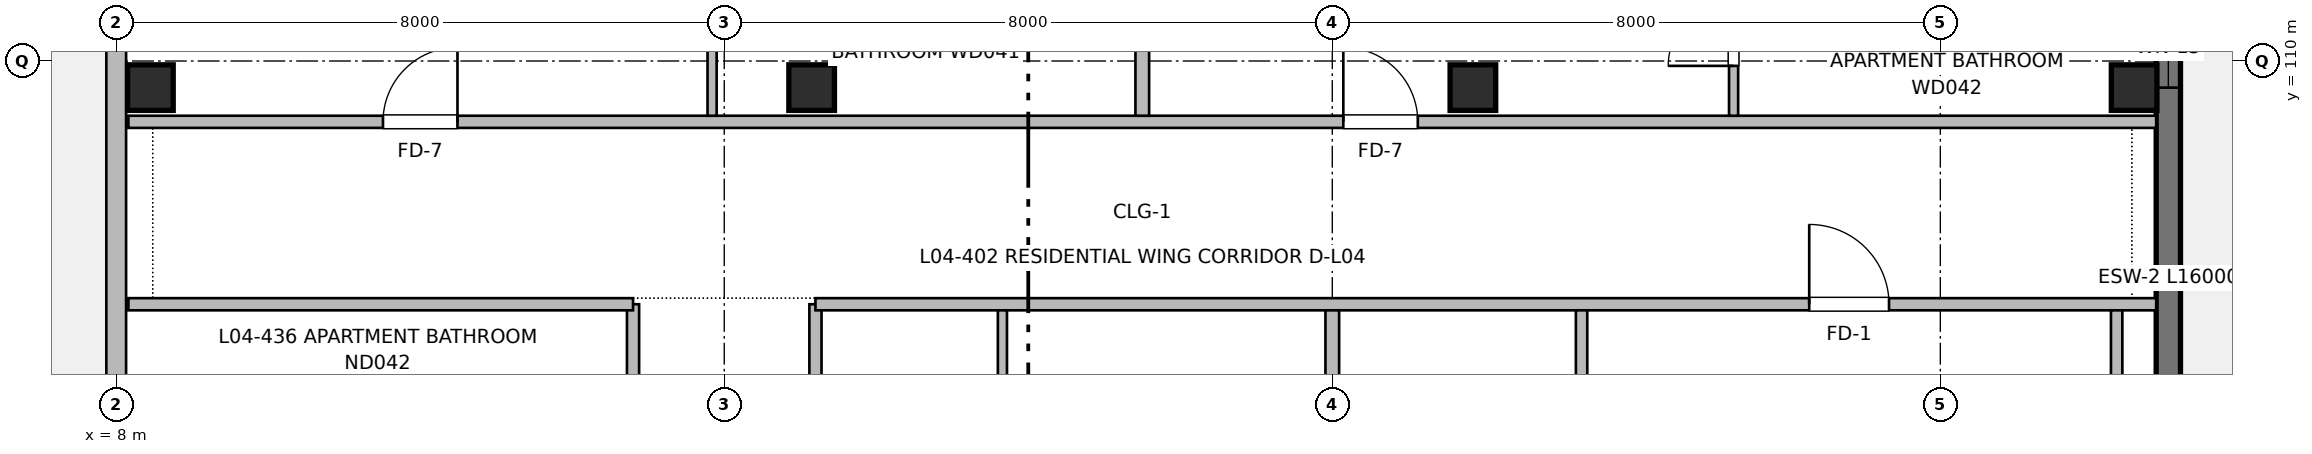
"""IFC4 building model, lengths in metres.
Left out: names, types, materials, properties, quantities, classifications, styles, units other than length and angle.
Written with IfcOpenShell. Run it as: python <this file> out.ifc"""

import sys

from ifc_helpers import new_model, si_unit, direction, frame, frame_2d, origin, origin_2d, place, context, subcontext, project, spatial, rectangle, extrude, element, fill, save


model = new_model("IFC4")
c1 = context("Model", 3, precision=1e-05, world=origin(), true_north=direction((0.0, 1.0)))
c2 = subcontext(c1, "Body", "Model", "MODEL_VIEW")
j1 = project(units=[si_unit("LENGTHUNIT", "METRE"), si_unit("PLANEANGLEUNIT", "RADIAN")], contexts=[c1])
p1 = place(None, origin())
s1 = spatial("IfcSite", under=j1, at=p1, CompositionType="ELEMENT")
p2 = place(p1, origin())
s2 = spatial("IfcBuilding", under=s1, at=p2, CompositionType="ELEMENT")
p3 = place(p2, frame((0.0, 0.0, 13.76)))
s3 = spatial("IfcBuildingStorey", under=s2, at=p3, CompositionType="ELEMENT", Elevation=13.76)
for number, where, z_axis, x_axis in (
    (1, (8.45, 109.65, 0.0), (0.0, 0.0, 1.0), (1.0, 0.0, 0.0)),
    (2, (17.15, 109.65, 0.0), (0.0, 0.0, 1.0), (1.0, 0.0, 0.0)),
    (3, (25.85, 109.65, 0.0), (0.0, 0.0, 1.0), (1.0, 0.0, 0.0)),
    (4, (34.55, 109.65, 0.0), (0.0, 0.0, 1.0), (1.0, 0.0, 0.0)),
):
    element("IfcColumn", number, at=place(p3, frame(where, z_axis=z_axis, x_axis=x_axis)), inside=s3, PredefinedType="COLUMN", context=c2, shape_type="SweptSolid", body=[
        extrude(rectangle(XDim=0.6, YDim=0.6, at=origin_2d()), origin(), (0.0, 0.0, 1.0), 3.2),
    ])
p4 = place(p3, frame((35.0, 116.0, 0.0), z_axis=(0.0, 0.0, 1.0), x_axis=(0.0, -1.0, 0.0)))
e5 = element("IfcWall", 5, at=p4, inside=s3, PredefinedType="SHEAR", context=c2, shape_type="SweptSolid", body=[
    extrude(rectangle(XDim=16.0, YDim=0.32, at=frame_2d((8.0, 0.0))), origin(), (0.0, 0.0, 1.0), 2.98),
])
p5 = place(p4, frame((2.95, 0.0, 0.0)))
e6 = element("IfcOpeningElement", 6, at=p5, cuts=e5, PredefinedType="OPENING", context=c2, shape_type="SweptSolid", body=[
    extrude(rectangle(XDim=1.2, YDim=2.2, at=frame_2d((0.6, 1.1))), frame((0.0, 0.17, 0.0), z_axis=(0.0, -1.0, 0.0), x_axis=(1.0, 0.0, 0.0)), (0.0, 0.0, 1.0), 0.34),
])
p6 = place(p4, frame((5.3, 0.0, 0.9)))
e7 = element("IfcOpeningElement", 7, at=p6, cuts=e5, PredefinedType="OPENING", context=c2, shape_type="SweptSolid", body=[
    extrude(rectangle(XDim=1.05, YDim=1.15, at=frame_2d((0.525, 0.575))), frame((0.0, 0.17, 0.0), z_axis=(0.0, -1.0, 0.0), x_axis=(1.0, 0.0, 0.0)), (0.0, 0.0, 1.0), 0.34),
])
p7 = place(p4, frame((11.35, 0.0, 0.82)))
e8 = element("IfcOpeningElement", 8, at=p7, cuts=e5, PredefinedType="OPENING", context=c2, shape_type="SweptSolid", body=[
    extrude(rectangle(XDim=1.3, YDim=1.4, at=frame_2d((0.65, 0.7))), frame((0.0, 0.17, 0.0), z_axis=(0.0, -1.0, 0.0), x_axis=(1.0, 0.0, 0.0)), (0.0, 0.0, 1.0), 0.34),
])
p8 = place(p3, frame((8.0, 56.0, 0.0), z_axis=(0.0, 0.0, 1.0), x_axis=(0.0, 1.0, 0.0)))
e9 = element("IfcWall", 9, at=p8, inside=s3, PredefinedType="SOLIDWALL", context=c2, shape_type="SweptSolid", body=[
    extrude(rectangle(XDim=60.0, YDim=0.26, at=frame_2d((30.0, 0.0))), origin(), (0.0, 0.0, 1.0), 2.98),
])
p9 = place(p8, frame((3.686, 0.0, 0.0)))
e10 = element("IfcOpeningElement", 10, at=p9, cuts=e9, PredefinedType="OPENING", context=c2, shape_type="SweptSolid", body=[
    extrude(rectangle(XDim=1.2, YDim=2.2, at=frame_2d((0.6, 1.1))), frame((0.0, 0.14, 0.0), z_axis=(0.0, -1.0, 0.0), x_axis=(1.0, 0.0, 0.0)), (0.0, 0.0, 1.0), 0.28),
])
p10 = place(p8, frame((5.586, 0.0, 0.9)))
e11 = element("IfcOpeningElement", 11, at=p10, cuts=e9, PredefinedType="OPENING", context=c2, shape_type="SweptSolid", body=[
    extrude(rectangle(XDim=1.05, YDim=1.15, at=frame_2d((0.525, 0.575))), frame((0.0, 0.14, 0.0), z_axis=(0.0, -1.0, 0.0), x_axis=(1.0, 0.0, 0.0)), (0.0, 0.0, 1.0), 0.28),
])
p11 = place(p8, frame((12.207, 0.0, 0.82)))
e12 = element("IfcOpeningElement", 12, at=p11, cuts=e9, PredefinedType="OPENING", context=c2, shape_type="SweptSolid", body=[
    extrude(rectangle(XDim=1.3, YDim=1.4, at=frame_2d((0.65, 0.7))), frame((0.0, 0.14, 0.0), z_axis=(0.0, -1.0, 0.0), x_axis=(1.0, 0.0, 0.0)), (0.0, 0.0, 1.0), 0.28),
])
p12 = place(p8, frame((19.079, 0.0, 0.67)))
e13 = element("IfcOpeningElement", 13, at=p12, cuts=e9, PredefinedType="OPENING", context=c2, shape_type="SweptSolid", body=[
    extrude(rectangle(XDim=2.1, YDim=1.55, at=frame_2d((1.05, 0.775))), frame((0.0, 0.14, 0.0), z_axis=(0.0, -1.0, 0.0), x_axis=(1.0, 0.0, 0.0)), (0.0, 0.0, 1.0), 0.28),
])
p13 = place(p8, frame((29.325, 0.0, 0.72)))
e14 = element("IfcOpeningElement", 14, at=p13, cuts=e9, PredefinedType="OPENING", context=c2, shape_type="SweptSolid", body=[
    extrude(rectangle(XDim=2.25, YDim=1.5, at=frame_2d((1.125, 0.75))), frame((0.0, 0.14, 0.0), z_axis=(0.0, -1.0, 0.0), x_axis=(1.0, 0.0, 0.0)), (0.0, 0.0, 1.0), 0.28),
])
p14 = place(p8, frame((38.046, 0.0, 0.9)))
e15 = element("IfcOpeningElement", 15, at=p14, cuts=e9, PredefinedType="OPENING", context=c2, shape_type="SweptSolid", body=[
    extrude(rectangle(XDim=1.05, YDim=1.15, at=frame_2d((0.525, 0.575))), frame((0.0, 0.14, 0.0), z_axis=(0.0, -1.0, 0.0), x_axis=(1.0, 0.0, 0.0)), (0.0, 0.0, 1.0), 0.28),
])
p15 = place(p8, frame((46.543, 0.0, 0.9)))
e16 = element("IfcOpeningElement", 16, at=p15, cuts=e9, PredefinedType="OPENING", context=c2, shape_type="SweptSolid", body=[
    extrude(rectangle(XDim=1.2, YDim=1.05, at=frame_2d((0.6, 0.525))), frame((0.0, 0.14, 0.0), z_axis=(0.0, -1.0, 0.0), x_axis=(1.0, 0.0, 0.0)), (0.0, 0.0, 1.0), 0.28),
])
p16 = place(p8, frame((55.839, 0.0, 0.9)))
e17 = element("IfcOpeningElement", 17, at=p16, cuts=e9, PredefinedType="OPENING", context=c2, shape_type="SweptSolid", body=[
    extrude(rectangle(XDim=0.65, YDim=0.95, at=frame_2d((0.325, 0.475))), frame((0.0, 0.14, 0.0), z_axis=(0.0, -1.0, 0.0), x_axis=(1.0, 0.0, 0.0)), (0.0, 0.0, 1.0), 0.28),
])
p17 = place(p3, frame((14.8, 56.16, 0.0), z_axis=(0.0, 0.0, 1.0), x_axis=(0.0, 1.0, 0.0)))
e18 = element("IfcWall", 18, at=p17, inside=s3, PredefinedType="PARTITIONING", context=c2, shape_type="SweptSolid", body=[
    extrude(rectangle(XDim=50.64, YDim=0.16, at=frame_2d((25.32, 0.0))), origin(), (0.0, 0.0, 1.0), 2.935),
])
p18 = place(p17, frame((12.84, 0.0, 0.0)))
e19 = element("IfcOpeningElement", 19, at=p18, cuts=e18, PredefinedType="OPENING", context=c2, shape_type="SweptSolid", body=[
    extrude(rectangle(XDim=1.1, YDim=2.15, at=frame_2d((0.55, 1.075))), frame((0.0, 0.09, 0.0), z_axis=(0.0, -1.0, 0.0), x_axis=(1.0, 0.0, 0.0)), (0.0, 0.0, 1.0), 0.18),
])
p19 = place(p17, frame((19.24, 0.0, 0.0)))
e20 = element("IfcOpeningElement", 20, at=p19, cuts=e18, PredefinedType="OPENING", context=c2, shape_type="SweptSolid", body=[
    extrude(rectangle(XDim=1.6, YDim=2.15, at=frame_2d((0.8, 1.075))), frame((0.0, 0.09, 0.0), z_axis=(0.0, -1.0, 0.0), x_axis=(1.0, 0.0, 0.0)), (0.0, 0.0, 1.0), 0.18),
])
p20 = place(p17, frame((1.8, 0.0, 0.0)))
e21 = element("IfcOpeningElement", 21, at=p20, cuts=e18, PredefinedType="OPENING", context=c2, shape_type="SweptSolid", body=[
    extrude(rectangle(XDim=0.96, YDim=2.15, at=frame_2d((0.48, 1.075))), frame((0.0, 0.09, 0.0), z_axis=(0.0, -1.0, 0.0), x_axis=(1.0, 0.0, 0.0)), (0.0, 0.0, 1.0), 0.18),
])
p21 = place(p17, frame((32.745, 0.0, 0.0)))
e22 = element("IfcOpeningElement", 22, at=p21, cuts=e18, PredefinedType="OPENING", context=c2, shape_type="SweptSolid", body=[
    extrude(rectangle(XDim=0.98, YDim=2.15, at=frame_2d((0.49, 1.075))), frame((0.0, 0.09, 0.0), z_axis=(0.0, -1.0, 0.0), x_axis=(1.0, 0.0, 0.0)), (0.0, 0.0, 1.0), 0.18),
])
p22 = place(p17, frame((40.955, 0.0, 0.0)))
e23 = element("IfcOpeningElement", 23, at=p22, cuts=e18, PredefinedType="OPENING", context=c2, shape_type="SweptSolid", body=[
    extrude(rectangle(XDim=0.98, YDim=2.15, at=frame_2d((0.49, 1.075))), frame((0.0, 0.09, 0.0), z_axis=(0.0, -1.0, 0.0), x_axis=(1.0, 0.0, 0.0)), (0.0, 0.0, 1.0), 0.18),
])
p23 = place(p3, frame((17.2, 56.16, 0.0), z_axis=(0.0, 0.0, 1.0), x_axis=(0.0, 1.0, 0.0)))
e24 = element("IfcWall", 24, at=p23, inside=s3, PredefinedType="PARTITIONING", context=c2, shape_type="SweptSolid", body=[
    extrude(rectangle(XDim=50.64, YDim=0.16, at=frame_2d((25.32, 0.0))), origin(), (0.0, 0.0, 1.0), 2.935),
])
p24 = place(p23, frame((6.99, 0.0, 0.0)))
e25 = element("IfcOpeningElement", 25, at=p24, cuts=e24, PredefinedType="OPENING", context=c2, shape_type="SweptSolid", body=[
    extrude(rectangle(XDim=0.98, YDim=2.15, at=frame_2d((0.49, 1.075))), frame((0.0, 0.09, 0.0), z_axis=(0.0, -1.0, 0.0), x_axis=(1.0, 0.0, 0.0)), (0.0, 0.0, 1.0), 0.18),
])
p25 = place(p23, frame((20.92, 0.0, 0.0)))
e26 = element("IfcOpeningElement", 26, at=p25, cuts=e24, PredefinedType="OPENING", context=c2, shape_type="SweptSolid", body=[
    extrude(rectangle(XDim=0.98, YDim=2.15, at=frame_2d((0.49, 1.075))), frame((0.0, 0.09, 0.0), z_axis=(0.0, -1.0, 0.0), x_axis=(1.0, 0.0, 0.0)), (0.0, 0.0, 1.0), 0.18),
])
p26 = place(p23, frame((33.68, 0.0, 0.0)))
e27 = element("IfcOpeningElement", 27, at=p26, cuts=e24, PredefinedType="OPENING", context=c2, shape_type="SweptSolid", body=[
    extrude(rectangle(XDim=0.98, YDim=2.15, at=frame_2d((0.49, 1.075))), frame((0.0, 0.09, 0.0), z_axis=(0.0, -1.0, 0.0), x_axis=(1.0, 0.0, 0.0)), (0.0, 0.0, 1.0), 0.18),
])
p27 = place(p23, frame((45.08, 0.0, 0.0)))
e28 = element("IfcOpeningElement", 28, at=p27, cuts=e24, PredefinedType="OPENING", context=c2, shape_type="SweptSolid", body=[
    extrude(rectangle(XDim=0.98, YDim=2.15, at=frame_2d((0.49, 1.075))), frame((0.0, 0.09, 0.0), z_axis=(0.0, -1.0, 0.0), x_axis=(1.0, 0.0, 0.0)), (0.0, 0.0, 1.0), 0.18),
])
p28 = place(p3, frame((8.16, 106.8, 0.0), z_axis=(0.0, 0.0, 1.0), x_axis=(1.0, 0.0, 0.0)))
e29 = element("IfcWall", 29, at=p28, inside=s3, PredefinedType="PARTITIONING", context=c2, shape_type="SweptSolid", body=[
    extrude(rectangle(XDim=6.64, YDim=0.16, at=frame_2d((3.32, 0.0))), origin(), (0.0, 0.0, 1.0), 2.935),
])
p29 = place(p3, frame((17.2, 106.8, 0.0), z_axis=(0.0, 0.0, 1.0), x_axis=(1.0, 0.0, 0.0)))
e30 = element("IfcWall", 30, at=p29, inside=s3, PredefinedType="PARTITIONING", context=c2, shape_type="SweptSolid", body=[
    extrude(rectangle(XDim=17.64, YDim=0.16, at=frame_2d((8.82, 0.0))), origin(), (0.0, 0.0, 1.0), 2.935),
])
p30 = place(p29, frame((13.075, 0.0, 0.0)))
e31 = element("IfcOpeningElement", 31, at=p30, cuts=e30, PredefinedType="OPENING", context=c2, shape_type="SweptSolid", body=[
    extrude(rectangle(XDim=1.05, YDim=2.15, at=frame_2d((0.525, 1.075))), frame((0.0, 0.09, 0.0), z_axis=(0.0, -1.0, 0.0), x_axis=(1.0, 0.0, 0.0)), (0.0, 0.0, 1.0), 0.18),
])
p31 = place(p3, frame((8.16, 109.2, 0.0), z_axis=(0.0, 0.0, 1.0), x_axis=(1.0, 0.0, 0.0)))
e32 = element("IfcWall", 32, at=p31, inside=s3, PredefinedType="PARTITIONING", context=c2, shape_type="SweptSolid", body=[
    extrude(rectangle(XDim=26.68, YDim=0.16, at=frame_2d((13.34, 0.0))), origin(), (0.0, 0.0, 1.0), 2.935),
])
p32 = place(p31, frame((3.35, 0.0, 0.0)))
e33 = element("IfcOpeningElement", 33, at=p32, cuts=e32, PredefinedType="OPENING", context=c2, shape_type="SweptSolid", body=[
    extrude(rectangle(XDim=0.98, YDim=2.15, at=frame_2d((0.49, 1.075))), frame((0.0, 0.09, 0.0), z_axis=(0.0, -1.0, 0.0), x_axis=(1.0, 0.0, 0.0)), (0.0, 0.0, 1.0), 0.18),
])
p33 = place(p31, frame((15.985, 0.0, 0.0)))
e34 = element("IfcOpeningElement", 34, at=p33, cuts=e32, PredefinedType="OPENING", context=c2, shape_type="SweptSolid", body=[
    extrude(rectangle(XDim=0.98, YDim=2.15, at=frame_2d((0.49, 1.075))), frame((0.0, 0.09, 0.0), z_axis=(0.0, -1.0, 0.0), x_axis=(1.0, 0.0, 0.0)), (0.0, 0.0, 1.0), 0.18),
])
p34 = place(p3, frame((24.0, 100.05, 0.0), z_axis=(0.0, 0.0, 1.0), x_axis=(0.0, 1.0, 0.0)))
e35 = element("IfcWall", 35, at=p34, inside=s3, PredefinedType="PARTITIONING", context=c2, shape_type="SweptSolid", body=[
    extrude(rectangle(XDim=6.67, YDim=0.18, at=frame_2d((3.335, 0.0))), origin(), (0.0, 0.0, 1.0), 2.935),
])
for number, where, z_axis, x_axis in (
    (36, (27.28, 103.99, 0.0), (0.0, 0.0, 1.0), (0.0, 1.0, 0.0)),
    (37, (34.32, 103.99, 0.0), (0.0, 0.0, 1.0), (0.0, 1.0, 0.0)),
):
    element("IfcWall", number, at=place(p3, frame(where, z_axis=z_axis, x_axis=x_axis)), inside=s3, PredefinedType="PARTITIONING", context=c2, shape_type="SweptSolid", body=[
        extrude(rectangle(XDim=2.73, YDim=0.15, at=frame_2d((1.365, 0.0))), origin(), (0.0, 0.0, 1.0), 2.935),
    ])
p35 = place(p3, frame((19.66, 95.18, 0.0), z_axis=(0.0, 0.0, 1.0), x_axis=(0.0, 1.0, 0.0)))
e38 = element("IfcWall", 38, at=p35, inside=s3, PredefinedType="PARTITIONING", context=c2, shape_type="SweptSolid", body=[
    extrude(rectangle(XDim=11.54, YDim=0.12, at=frame_2d((5.77, 0.0))), origin(), (0.0, 0.0, 1.0), 2.935),
])
p36 = place(p35, frame((2.018, 0.0, 0.0)))
e39 = element("IfcOpeningElement", 39, at=p36, cuts=e38, PredefinedType="OPENING", context=c2, shape_type="SweptSolid", body=[
    extrude(rectangle(XDim=0.86, YDim=2.1, at=frame_2d((0.43, 1.05))), frame((0.0, 0.07, 0.0), z_axis=(0.0, -1.0, 0.0), x_axis=(1.0, 0.0, 0.0)), (0.0, 0.0, 1.0), 0.14),
])
p37 = place(p35, frame((7.054, 0.0, 0.0)))
e40 = element("IfcOpeningElement", 40, at=p37, cuts=e38, PredefinedType="OPENING", context=c2, shape_type="SweptSolid", body=[
    extrude(rectangle(XDim=0.92, YDim=2.1, at=frame_2d((0.46, 1.05))), frame((0.0, 0.07, 0.0), z_axis=(0.0, -1.0, 0.0), x_axis=(1.0, 0.0, 0.0)), (0.0, 0.0, 1.0), 0.14),
])
p38 = place(p3, frame((21.5, 109.28, 0.0), z_axis=(0.0, 0.0, 1.0), x_axis=(0.0, 1.0, 0.0)))
e41 = element("IfcWall", 41, at=p38, inside=s3, PredefinedType="PARTITIONING", context=c2, shape_type="SweptSolid", body=[
    extrude(rectangle(XDim=6.59, YDim=0.18, at=frame_2d((3.295, 0.0))), origin(), (0.0, 0.0, 1.0), 2.935),
])
p39 = place(p3, frame((15.84, 109.28, 0.0), z_axis=(0.0, 0.0, 1.0), x_axis=(0.0, 1.0, 0.0)))
e42 = element("IfcWall", 42, at=p39, inside=s3, PredefinedType="PARTITIONING", context=c2, shape_type="SweptSolid", body=[
    extrude(rectangle(XDim=6.59, YDim=0.12, at=frame_2d((3.295, 0.0))), origin(), (0.0, 0.0, 1.0), 2.935),
])
p40 = place(p39, frame((2.306, 0.0, 0.0)))
e43 = element("IfcOpeningElement", 43, at=p40, cuts=e42, PredefinedType="OPENING", context=c2, shape_type="SweptSolid", body=[
    extrude(rectangle(XDim=0.86, YDim=2.1, at=frame_2d((0.43, 1.05))), frame((0.0, 0.07, 0.0), z_axis=(0.0, -1.0, 0.0), x_axis=(1.0, 0.0, 0.0)), (0.0, 0.0, 1.0), 0.14),
])
p41 = place(p39, frame((4.093, 0.0, 0.0)))
e44 = element("IfcOpeningElement", 44, at=p41, cuts=e42, PredefinedType="OPENING", context=c2, shape_type="SweptSolid", body=[
    extrude(rectangle(XDim=0.9, YDim=2.1, at=frame_2d((0.45, 1.05))), frame((0.0, 0.07, 0.0), z_axis=(0.0, -1.0, 0.0), x_axis=(1.0, 0.0, 0.0)), (0.0, 0.0, 1.0), 0.14),
])
p42 = place(p3, frame((29.28, 109.28, 0.0), z_axis=(0.0, 0.0, 1.0), x_axis=(0.0, 1.0, 0.0)))
e45 = element("IfcWall", 45, at=p42, inside=s3, PredefinedType="PARTITIONING", context=c2, shape_type="SweptSolid", body=[
    extrude(rectangle(XDim=6.59, YDim=0.12, at=frame_2d((3.295, 0.0))), origin(), (0.0, 0.0, 1.0), 2.935),
])
p43 = place(p42, frame((0.656, 0.0, 0.0)))
e46 = element("IfcOpeningElement", 46, at=p43, cuts=e45, PredefinedType="OPENING", context=c2, shape_type="SweptSolid", body=[
    extrude(rectangle(XDim=0.86, YDim=2.1, at=frame_2d((0.43, 1.05))), frame((0.0, 0.07, 0.0), z_axis=(0.0, -1.0, 0.0), x_axis=(1.0, 0.0, 0.0)), (0.0, 0.0, 1.0), 0.14),
])
p44 = place(p42, frame((4.093, 0.0, 0.0)))
e47 = element("IfcOpeningElement", 47, at=p44, cuts=e45, PredefinedType="OPENING", context=c2, shape_type="SweptSolid", body=[
    extrude(rectangle(XDim=0.9, YDim=2.1, at=frame_2d((0.45, 1.05))), frame((0.0, 0.07, 0.0), z_axis=(0.0, -1.0, 0.0), x_axis=(1.0, 0.0, 0.0)), (0.0, 0.0, 1.0), 0.14),
])
p45 = place(p6, origin())
e48 = element("IfcWindow", 48, at=p45, inside=s3, PartitioningType="SINGLE_PANEL", PredefinedType="WINDOW", context=c2, shape_type="SweptSolid", body=[
    extrude(rectangle(XDim=1.05, YDim=1.15, at=frame_2d((0.525, 0.575))), frame((0.0, 0.03, 0.0), z_axis=(0.0, -1.0, 0.0), x_axis=(1.0, 0.0, 0.0)), (0.0, 0.0, 1.0), 0.06),
])
fill(e7, e48)
p46 = place(p30, origin())
e49 = element("IfcDoor", 49, at=p46, inside=s3, OperationType="SINGLE_SWING_LEFT", PredefinedType="DOOR", context=c2, shape_type="SweptSolid", body=[
    extrude(rectangle(XDim=1.05, YDim=2.15, at=frame_2d((0.525, 1.075))), frame((0.0, 0.025, 0.0), z_axis=(0.0, -1.0, 0.0), x_axis=(1.0, 0.0, 0.0)), (0.0, 0.0, 1.0), 0.05),
])
fill(e31, e49)
p47 = place(p32, origin())
e50 = element("IfcDoor", 50, at=p47, inside=s3, OperationType="SINGLE_SWING_RIGHT", PredefinedType="DOOR", context=c2, shape_type="SweptSolid", body=[
    extrude(rectangle(XDim=0.98, YDim=2.15, at=frame_2d((0.49, 1.075))), frame((0.0, 0.025, 0.0), z_axis=(0.0, -1.0, 0.0), x_axis=(1.0, 0.0, 0.0)), (0.0, 0.0, 1.0), 0.05),
])
fill(e33, e50)
p48 = place(p33, origin())
e51 = element("IfcDoor", 51, at=p48, inside=s3, OperationType="SINGLE_SWING_LEFT", PredefinedType="DOOR", context=c2, shape_type="SweptSolid", body=[
    extrude(rectangle(XDim=0.98, YDim=2.15, at=frame_2d((0.49, 1.075))), frame((0.0, 0.025, 0.0), z_axis=(0.0, -1.0, 0.0), x_axis=(1.0, 0.0, 0.0)), (0.0, 0.0, 1.0), 0.05),
])
fill(e34, e51)
p49 = place(p43, origin())
e52 = element("IfcDoor", 52, at=p49, inside=s3, OperationType="SINGLE_SWING_LEFT", PredefinedType="DOOR", context=c2, shape_type="SweptSolid", body=[
    extrude(rectangle(XDim=0.86, YDim=2.1, at=frame_2d((0.43, 1.05))), frame((0.0, 0.025, 0.0), z_axis=(0.0, -1.0, 0.0), x_axis=(1.0, 0.0, 0.0)), (0.0, 0.0, 1.0), 0.05),
])
fill(e46, e52)
save(model, sys.argv[1])
